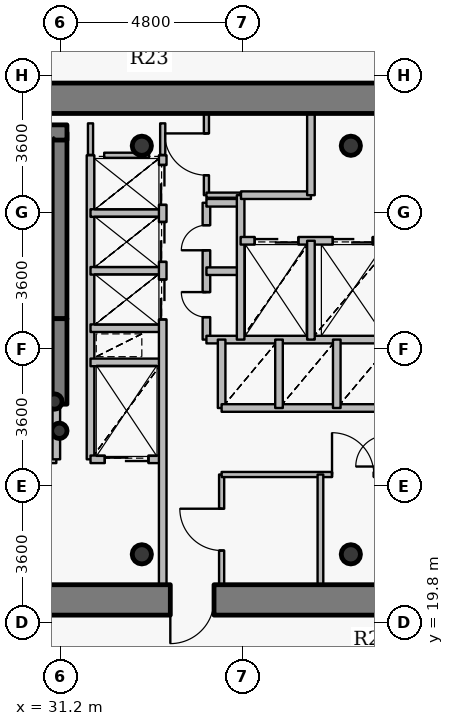
"""IFC4 building model, lengths in metres.
Left out: names, types, materials, properties, quantities, classifications, styles, units other than length and angle.
Written with IfcOpenShell. Run it as: python <this file> out.ifc"""

import sys

from ifc_helpers import new_model, si_unit, direction, frame, frame_2d, origin, origin_2d, place, context, subcontext, project, spatial, rectangle, hollow_circle, extrude, source, transform, mapped, element, fill, save


model = new_model("IFC4")
c1 = context("Model", 3, precision=1e-05, world=origin(), true_north=direction((0.0, 1.0)))
c2 = subcontext(c1, "Body", "Model", "MODEL_VIEW")
j1 = project(units=[si_unit("LENGTHUNIT", "METRE"), si_unit("PLANEANGLEUNIT", "RADIAN")], contexts=[c1])
p1 = place(None, origin())
s1 = spatial("IfcSite", under=j1, at=p1, CompositionType="ELEMENT")
p2 = place(p1, origin())
s2 = spatial("IfcBuilding", under=s1, at=p2, CompositionType="ELEMENT")
p3 = place(p2, frame((0.0, 0.0, 186.15)))
s3 = spatial("IfcBuildingStorey", under=s2, at=p3, CompositionType="ELEMENT", Elevation=186.15)
for number, where, z_axis, x_axis in (
    (1, (33.35, 21.6, 0.0), (0.0, 0.0, 1.0), (1.0, 0.0, 0.0)),
    (2, (38.85, 21.6, 0.0), (0.0, 0.0, 1.0), (1.0, 0.0, 0.0)),
    (3, (38.85, 32.35, 0.0), (0.0, 0.0, 1.0), (1.0, 0.0, 0.0)),
    (4, (33.35, 32.35, 0.0), (0.0, 0.0, 1.0), (1.0, 0.0, 0.0)),
):
    element("IfcColumn", number, at=place(p3, frame(where, z_axis=z_axis, x_axis=x_axis)), inside=s3, PredefinedType="COLUMN", context=c2, shape_type="SweptSolid", body=[
        extrude(hollow_circle(Radius=0.254, WallThickness=0.02, at=origin_2d()), origin(), (0.0, 0.0, 1.0), 3.75),
    ])
p4 = place(p3, frame((31.18, 27.8, 0.0), z_axis=(0.0, 0.0, 1.0), x_axis=(0.0, 1.0, 0.0)))
e5 = element("IfcWall", 5, at=p4, inside=s3, PredefinedType="SHEAR", context=c2, shape_type="SweptSolid", body=[
    extrude(rectangle(XDim=4.9, YDim=0.4, at=frame_2d((2.45, 0.0))), origin(), (0.0, 0.0, 1.0), 3.75),
])
p5 = place(p3, frame((27.28, 32.7, 0.0), z_axis=(0.0, 0.0, 1.0), x_axis=(1.0, 0.0, 0.0)))
e6 = element("IfcWall", 6, at=p5, inside=s3, PredefinedType="SHEAR", context=c2, shape_type="SweptSolid", body=[
    extrude(rectangle(XDim=4.1, YDim=0.4, at=frame_2d((2.05, 0.0))), origin(), (0.0, 0.0, 1.0), 3.75),
])
for number, where, z_axis, x_axis in (
    (7, (31.05, 25.62, 0.0), (0.0, 0.0, 1.0), (1.0, 0.0, 0.0)),
    (8, (31.18, 24.85, 0.0), (0.0, 0.0, 1.0), (1.0, 0.0, 0.0)),
):
    element("IfcColumn", number, at=place(p3, frame(where, z_axis=z_axis, x_axis=x_axis)), inside=s3, PredefinedType="COLUMN", context=c2, shape_type="SweptSolid", body=[
        extrude(hollow_circle(Radius=0.203, WallThickness=0.016, at=origin_2d()), origin(), (0.0, 0.0, 1.0), 3.75),
    ])
p6 = place(p3, frame((27.2, 33.6, 0.0), z_axis=(0.0, 0.0, 1.0), x_axis=(1.0, 0.0, 0.0)))
e9 = element("IfcWall", 9, at=p6, inside=s3, PredefinedType="SHEAR", context=c2, shape_type="SweptSolid", body=[
    extrude(rectangle(XDim=17.6, YDim=0.8, at=frame_2d((8.8, 0.0))), origin(), (0.0, 0.0, 1.0), 2.95),
])
p7 = place(p6, frame((13.45, 0.0, 0.0)))
e10 = element("IfcOpeningElement", 10, at=p7, cuts=e9, PredefinedType="OPENING", context=c2, shape_type="SweptSolid", body=[
    extrude(rectangle(XDim=1.15, YDim=2.15, at=origin_2d()), frame((0.575, 0.41, 1.075), z_axis=(0.0, -1.0, 0.0), x_axis=(1.0, 0.0, 0.0)), (0.0, 0.0, 1.0), 0.82),
])
p8 = place(p3, frame((44.8, 20.4, 0.0), z_axis=(0.0, 0.0, 1.0), x_axis=(-1.0, 0.0, 0.0)))
e11 = element("IfcWall", 11, at=p8, inside=s3, PredefinedType="SHEAR", context=c2, shape_type="SweptSolid", body=[
    extrude(rectangle(XDim=17.6, YDim=0.8, at=frame_2d((8.8, 0.0))), origin(), (0.0, 0.0, 1.0), 2.95),
])
p9 = place(p8, frame((9.55, 0.0, 0.0)))
e12 = element("IfcOpeningElement", 12, at=p9, cuts=e11, PredefinedType="OPENING", context=c2, shape_type="SweptSolid", body=[
    extrude(rectangle(XDim=1.15, YDim=2.15, at=origin_2d()), frame((0.575, 0.41, 1.075), z_axis=(0.0, -1.0, 0.0), x_axis=(1.0, 0.0, 0.0)), (0.0, 0.0, 1.0), 0.82),
])
p10 = place(p3, frame((31.18, 25.55, 0.0), z_axis=(0.0, 0.0, 1.0), x_axis=(0.0, 1.0, 0.0)))
e13 = element("IfcWall", 13, at=p10, inside=s3, PredefinedType="SHEAR", context=c2, shape_type="SweptSolid", body=[
    extrude(rectangle(XDim=2.25, YDim=0.4, at=frame_2d((1.125, 0.0))), origin(), (0.0, 0.0, 1.0), 3.1),
])
p11 = place(p3, frame((27.56, 24.1, 0.0), z_axis=(0.0, 0.0, 1.0), x_axis=(1.0, 0.0, 0.0)))
e14 = element("IfcWall", 14, at=p11, inside=s3, PredefinedType="PARTITIONING", context=c2, shape_type="SweptSolid", body=[
    extrude(rectangle(XDim=3.54, YDim=0.2, at=frame_2d((1.77, 0.0))), origin(), (0.0, 0.0, 1.0), 3.5),
])
p12 = place(p11, frame((1.17, 0.0, 0.0)))
e15 = element("IfcOpeningElement", 15, at=p12, cuts=e14, PredefinedType="OPENING", context=c2, shape_type="SweptSolid", body=[
    extrude(rectangle(XDim=1.2, YDim=2.15, at=origin_2d()), frame((0.6, 0.11, 1.075), z_axis=(0.0, -1.0, 0.0), x_axis=(1.0, 0.0, 0.0)), (0.0, 0.0, 1.0), 0.22),
])
p13 = place(p3, frame((31.1, 24.1, 0.0), z_axis=(0.0, 0.0, 1.0), x_axis=(0.0, 1.0, 0.0)))
e16 = element("IfcWall", 16, at=p13, inside=s3, PredefinedType="PARTITIONING", context=c2, shape_type="SweptSolid", body=[
    extrude(rectangle(XDim=1.44, YDim=0.2, at=frame_2d((0.72, 0.0))), origin(), (0.0, 0.0, 1.0), 3.5),
])
p14 = place(p3, frame((32.0, 24.1, 0.0), z_axis=(0.0, 0.0, 1.0), x_axis=(0.0, 1.0, 0.0)))
e17 = element("IfcWall", 17, at=p14, inside=s3, PredefinedType="PARTITIONING", context=c2, shape_type="SweptSolid", body=[
    extrude(rectangle(XDim=8.0, YDim=0.2, at=frame_2d((4.0, 0.0))), origin(), (0.0, 0.0, 1.0), 3.5),
])
p15 = place(p3, frame((32.0, 24.1, 0.0), z_axis=(0.0, 0.0, 1.0), x_axis=(1.0, 0.0, 0.0)))
e18 = element("IfcWall", 18, at=p15, inside=s3, PredefinedType="PARTITIONING", context=c2, shape_type="SweptSolid", body=[
    extrude(rectangle(XDim=1.9, YDim=0.2, at=frame_2d((0.95, 0.0))), origin(), (0.0, 0.0, 1.0), 3.085),
])
p16 = place(p15, frame((0.375, 0.0, 0.0)))
e19 = element("IfcOpeningElement", 19, at=p16, cuts=e18, PredefinedType="OPENING", context=c2, shape_type="SweptSolid", body=[
    extrude(rectangle(XDim=1.15, YDim=2.15, at=origin_2d()), frame((0.575, 0.11, 1.075), z_axis=(0.0, -1.0, 0.0), x_axis=(1.0, 0.0, 0.0)), (0.0, 0.0, 1.0), 0.22),
])
for number, where, z_axis, x_axis in (
    (20, (32.0, 26.65, 0.0), (0.0, 0.0, 1.0), (1.0, 0.0, 0.0)),
    (21, (32.0, 27.55, 0.0), (0.0, 0.0, 1.0), (1.0, 0.0, 0.0)),
    (22, (32.0, 29.06, 0.0), (0.0, 0.0, 1.0), (1.0, 0.0, 0.0)),
    (23, (32.0, 30.58, 0.0), (0.0, 0.0, 1.0), (1.0, 0.0, 0.0)),
):
    element("IfcWall", number, at=place(p3, frame(where, z_axis=z_axis, x_axis=x_axis)), inside=s3, PredefinedType="PARTITIONING", context=c2, shape_type="SweptSolid", body=[
        extrude(rectangle(XDim=1.9, YDim=0.2, at=frame_2d((0.95, 0.0))), origin(), (0.0, 0.0, 1.0), 3.085),
    ])
p17 = place(p3, frame((33.9, 20.8, 0.0), z_axis=(0.0, 0.0, 1.0), x_axis=(0.0, 1.0, 0.0)))
e24 = element("IfcWall", 24, at=p17, inside=s3, PredefinedType="PARTITIONING", context=c2, shape_type="SweptSolid", body=[
    extrude(rectangle(XDim=11.3, YDim=0.2, at=frame_2d((5.65, 0.0))), origin(), (0.0, 0.0, 1.0), 3.085),
])
p18 = place(p17, frame((6.98, 0.0, 0.0)))
e25 = element("IfcOpeningElement", 25, at=p18, cuts=e24, PredefinedType="OPENING", context=c2, shape_type="SweptSolid", body=[
    extrude(rectangle(XDim=1.05, YDim=2.15, at=origin_2d()), frame((0.525, 0.11, 1.075), z_axis=(0.0, -1.0, 0.0), x_axis=(1.0, 0.0, 0.0)), (0.0, 0.0, 1.0), 0.22),
])
p19 = place(p17, frame((8.495, 0.0, 0.0)))
e26 = element("IfcOpeningElement", 26, at=p19, cuts=e24, PredefinedType="OPENING", context=c2, shape_type="SweptSolid", body=[
    extrude(rectangle(XDim=1.05, YDim=2.15, at=origin_2d()), frame((0.525, 0.11, 1.075), z_axis=(0.0, -1.0, 0.0), x_axis=(1.0, 0.0, 0.0)), (0.0, 0.0, 1.0), 0.22),
])
p20 = place(p17, frame((9.995, 0.0, 0.0)))
e27 = element("IfcOpeningElement", 27, at=p20, cuts=e24, PredefinedType="OPENING", context=c2, shape_type="SweptSolid", body=[
    extrude(rectangle(XDim=1.05, YDim=2.15, at=origin_2d()), frame((0.525, 0.11, 1.075), z_axis=(0.0, -1.0, 0.0), x_axis=(1.0, 0.0, 0.0)), (0.0, 0.0, 1.0), 0.22),
])
p21 = place(p3, frame((35.05, 27.25, 0.0), z_axis=(0.0, 0.0, 1.0), x_axis=(0.0, 1.0, 0.0)))
e28 = element("IfcWall", 28, at=p21, inside=s3, PredefinedType="PARTITIONING", context=c2, shape_type="SweptSolid", body=[
    extrude(rectangle(XDim=3.6, YDim=0.2, at=frame_2d((1.8, 0.0))), origin(), (0.0, 0.0, 1.0), 3.5),
])
p22 = place(p21, frame((0.59, 0.0, 0.0)))
e29 = element("IfcOpeningElement", 29, at=p22, cuts=e28, PredefinedType="OPENING", context=c2, shape_type="SweptSolid", body=[
    extrude(rectangle(XDim=0.66, YDim=2.05, at=origin_2d()), frame((0.33, 0.11, 1.025), z_axis=(0.0, -1.0, 0.0), x_axis=(1.0, 0.0, 0.0)), (0.0, 0.0, 1.0), 0.22),
])
p23 = place(p21, frame((2.35, 0.0, 0.0)))
e30 = element("IfcOpeningElement", 30, at=p23, cuts=e28, PredefinedType="OPENING", context=c2, shape_type="SweptSolid", body=[
    extrude(rectangle(XDim=0.66, YDim=2.05, at=origin_2d()), frame((0.33, 0.11, 1.025), z_axis=(0.0, -1.0, 0.0), x_axis=(1.0, 0.0, 0.0)), (0.0, 0.0, 1.0), 0.22),
])
p24 = place(p3, frame((35.05, 27.25, 0.0), z_axis=(0.0, 0.0, 1.0), x_axis=(1.0, 0.0, 0.0)))
e31 = element("IfcWall", 31, at=p24, inside=s3, PredefinedType="PARTITIONING", context=c2, shape_type="SweptSolid", body=[
    extrude(rectangle(XDim=4.95, YDim=0.2, at=frame_2d((2.475, 0.0))), origin(), (0.0, 0.0, 1.0), 3.085),
])
for number, where, z_axis, x_axis in (
    (32, (35.05, 29.05, 0.0), (0.0, 0.0, 1.0), (1.0, 0.0, 0.0)),
    (33, (35.05, 30.85, 0.0), (0.0, 0.0, 1.0), (1.0, 0.0, 0.0)),
):
    element("IfcWall", number, at=place(p3, frame(where, z_axis=z_axis, x_axis=x_axis)), inside=s3, PredefinedType="PARTITIONING", context=c2, shape_type="SweptSolid", body=[
        extrude(rectangle(XDim=0.9, YDim=0.2, at=frame_2d((0.45, 0.0))), origin(), (0.0, 0.0, 1.0), 3.5),
    ])
p25 = place(p3, frame((35.05, 31.05, 0.0), z_axis=(0.0, 0.0, 1.0), x_axis=(0.0, 1.0, 0.0)))
e34 = element("IfcWall", 34, at=p25, inside=s3, PredefinedType="PARTITIONING", context=c2, shape_type="SweptSolid", body=[
    extrude(rectangle(XDim=2.15, YDim=0.135, at=frame_2d((1.075, 0.0))), origin(), (0.0, 0.0, 1.0), 3.085),
])
p26 = place(p25, frame((0.525, 0.0, 0.0)))
e35 = element("IfcOpeningElement", 35, at=p26, cuts=e34, PredefinedType="OPENING", context=c2, shape_type="SweptSolid", body=[
    extrude(rectangle(XDim=1.1, YDim=2.15, at=origin_2d()), frame((0.55, 0.078, 1.075), z_axis=(0.0, -1.0, 0.0), x_axis=(1.0, 0.0, 0.0)), (0.0, 0.0, 1.0), 0.155),
])
p27 = place(p3, frame((35.05, 31.05, 0.0), z_axis=(0.0, 0.0, 1.0), x_axis=(1.0, 0.0, 0.0)))
e36 = element("IfcWall", 36, at=p27, inside=s3, PredefinedType="PARTITIONING", context=c2, shape_type="SweptSolid", body=[
    extrude(rectangle(XDim=0.9, YDim=0.135, at=frame_2d((0.45, 0.0))), origin(), (0.0, 0.0, 1.0), 3.5),
])
p28 = place(p3, frame((35.45, 20.8, 0.0), z_axis=(0.0, 0.0, 1.0), x_axis=(0.0, 1.0, 0.0)))
e37 = element("IfcWall", 37, at=p28, inside=s3, PredefinedType="PARTITIONING", context=c2, shape_type="SweptSolid", body=[
    extrude(rectangle(XDim=2.9, YDim=0.135, at=frame_2d((1.45, 0.0))), origin(), (0.0, 0.0, 1.0), 3.085),
])
p29 = place(p28, frame((0.9, 0.0, 0.0)))
e38 = element("IfcOpeningElement", 38, at=p29, cuts=e37, PredefinedType="OPENING", context=c2, shape_type="SweptSolid", body=[
    extrude(rectangle(XDim=1.1, YDim=2.15, at=origin_2d()), frame((0.55, 0.078, 1.075), z_axis=(0.0, -1.0, 0.0), x_axis=(1.0, 0.0, 0.0)), (0.0, 0.0, 1.0), 0.155),
])
p30 = place(p3, frame((35.45, 23.7, 0.0), z_axis=(0.0, 0.0, 1.0), x_axis=(1.0, 0.0, 0.0)))
e39 = element("IfcWall", 39, at=p30, inside=s3, PredefinedType="PARTITIONING", context=c2, shape_type="SweptSolid", body=[
    extrude(rectangle(XDim=4.35, YDim=0.135, at=frame_2d((2.175, 0.0))), origin(), (0.0, 0.0, 1.0), 3.085),
])
p31 = place(p30, frame((2.905, 0.0, 0.0)))
e40 = element("IfcOpeningElement", 40, at=p31, cuts=e39, PredefinedType="OPENING", context=c2, shape_type="SweptSolid", body=[
    extrude(rectangle(XDim=1.1, YDim=2.15, at=origin_2d()), frame((0.55, 0.078, 1.075), z_axis=(0.0, -1.0, 0.0), x_axis=(1.0, 0.0, 0.0)), (0.0, 0.0, 1.0), 0.155),
])
p32 = place(p3, frame((35.45, 25.45, 0.0), z_axis=(0.0, 0.0, 1.0), x_axis=(0.0, 1.0, 0.0)))
e41 = element("IfcWall", 41, at=p32, inside=s3, PredefinedType="PARTITIONING", context=c2, shape_type="SweptSolid", body=[
    extrude(rectangle(XDim=1.8, YDim=0.2, at=frame_2d((0.9, 0.0))), origin(), (0.0, 0.0, 1.0), 3.5),
])
p33 = place(p3, frame((35.45, 25.45, 0.0), z_axis=(0.0, 0.0, 1.0), x_axis=(1.0, 0.0, 0.0)))
e42 = element("IfcWall", 42, at=p33, inside=s3, PredefinedType="PARTITIONING", context=c2, shape_type="SweptSolid", body=[
    extrude(rectangle(XDim=4.55, YDim=0.2, at=frame_2d((2.275, 0.0))), origin(), (0.0, 0.0, 1.0), 3.085),
])
p34 = place(p3, frame((35.95, 27.25, 0.0), z_axis=(0.0, 0.0, 1.0), x_axis=(0.0, 1.0, 0.0)))
e43 = element("IfcWall", 43, at=p34, inside=s3, PredefinedType="PARTITIONING", context=c2, shape_type="SweptSolid", body=[
    extrude(rectangle(XDim=3.8, YDim=0.2, at=frame_2d((1.9, 0.0))), origin(), (0.0, 0.0, 1.0), 3.5),
])
p35 = place(p3, frame((35.95, 29.85, 0.0), z_axis=(0.0, 0.0, 1.0), x_axis=(1.0, 0.0, 0.0)))
e44 = element("IfcWall", 44, at=p35, inside=s3, PredefinedType="PARTITIONING", context=c2, shape_type="SweptSolid", body=[
    extrude(rectangle(XDim=8.49, YDim=0.2, at=frame_2d((4.245, 0.0))), origin(), (0.0, 0.0, 1.0), 3.085),
])
p36 = place(p35, frame((6.1, 0.0, 0.0)))
e45 = element("IfcOpeningElement", 45, at=p36, cuts=e44, PredefinedType="OPENING", context=c2, shape_type="SweptSolid", body=[
    extrude(rectangle(XDim=1.2, YDim=2.15, at=origin_2d()), frame((0.6, 0.11, 1.075), z_axis=(0.0, -1.0, 0.0), x_axis=(1.0, 0.0, 0.0)), (0.0, 0.0, 1.0), 0.22),
])
p37 = place(p35, frame((0.37, 0.0, 0.0)))
e46 = element("IfcOpeningElement", 46, at=p37, cuts=e44, PredefinedType="OPENING", context=c2, shape_type="SweptSolid", body=[
    extrude(rectangle(XDim=1.15, YDim=2.15, at=origin_2d()), frame((0.575, 0.11, 1.075), z_axis=(0.0, -1.0, 0.0), x_axis=(1.0, 0.0, 0.0)), (0.0, 0.0, 1.0), 0.22),
])
p38 = place(p35, frame((2.425, 0.0, 0.0)))
e47 = element("IfcOpeningElement", 47, at=p38, cuts=e44, PredefinedType="OPENING", context=c2, shape_type="SweptSolid", body=[
    extrude(rectangle(XDim=1.05, YDim=2.15, at=origin_2d()), frame((0.525, 0.11, 1.075), z_axis=(0.0, -1.0, 0.0), x_axis=(1.0, 0.0, 0.0)), (0.0, 0.0, 1.0), 0.22),
])
p39 = place(p3, frame((35.96, 31.05, 0.0), z_axis=(0.0, 0.0, 1.0), x_axis=(1.0, 0.0, 0.0)))
e48 = element("IfcWall", 48, at=p39, inside=s3, PredefinedType="PARTITIONING", context=c2, shape_type="SweptSolid", body=[
    extrude(rectangle(XDim=1.84, YDim=0.2, at=frame_2d((0.92, 0.0))), origin(), (0.0, 0.0, 1.0), 3.5),
])
p40 = place(p3, frame((36.96, 25.45, 0.0), z_axis=(0.0, 0.0, 1.0), x_axis=(0.0, 1.0, 0.0)))
e49 = element("IfcWall", 49, at=p40, inside=s3, PredefinedType="PARTITIONING", context=c2, shape_type="SweptSolid", body=[
    extrude(rectangle(XDim=1.8, YDim=0.2, at=frame_2d((0.9, 0.0))), origin(), (0.0, 0.0, 1.0), 3.5),
])
p41 = place(p3, frame((37.8, 27.25, 0.0), z_axis=(0.0, 0.0, 1.0), x_axis=(0.0, 1.0, 0.0)))
e50 = element("IfcWall", 50, at=p41, inside=s3, PredefinedType="PARTITIONING", context=c2, shape_type="SweptSolid", body=[
    extrude(rectangle(XDim=2.6, YDim=0.2, at=frame_2d((1.3, 0.0))), origin(), (0.0, 0.0, 1.0), 3.5),
])
p42 = place(p3, frame((37.8, 31.05, 0.0), z_axis=(0.0, 0.0, 1.0), x_axis=(0.0, 1.0, 0.0)))
e51 = element("IfcWall", 51, at=p42, inside=s3, PredefinedType="PARTITIONING", context=c2, shape_type="SweptSolid", body=[
    extrude(rectangle(XDim=2.15, YDim=0.2, at=frame_2d((1.075, 0.0))), origin(), (0.0, 0.0, 1.0), 3.085),
])
p43 = place(p3, frame((38.05, 20.18, 0.0), z_axis=(0.0, 0.0, 1.0), x_axis=(0.0, 1.0, 0.0)))
e52 = element("IfcWall", 52, at=p43, inside=s3, PredefinedType="PARTITIONING", context=c2, shape_type="SweptSolid", body=[
    extrude(rectangle(XDim=3.52, YDim=0.15, at=frame_2d((1.76, 0.0))), origin(), (0.0, 0.0, 1.0), 2.935),
])
p44 = place(p3, frame((38.48, 25.45, 0.0), z_axis=(0.0, 0.0, 1.0), x_axis=(0.0, 1.0, 0.0)))
e53 = element("IfcWall", 53, at=p44, inside=s3, PredefinedType="PARTITIONING", context=c2, shape_type="SweptSolid", body=[
    extrude(rectangle(XDim=1.8, YDim=0.2, at=frame_2d((0.9, 0.0))), origin(), (0.0, 0.0, 1.0), 3.5),
])
p45 = place(p3, frame((32.36, 32.1, 0.0), z_axis=(0.0, 0.0, 1.0), x_axis=(1.0, 0.0, 0.0)))
e54 = element("IfcWall", 54, at=p45, inside=s3, PredefinedType="PARTITIONING", context=c2, shape_type="SweptSolid", body=[
    extrude(rectangle(XDim=1.18, YDim=0.135, at=frame_2d((0.59, 0.0))), origin(), (0.0, 0.0, 1.0), 3.085),
])
p46 = place(p3, frame((32.0, 32.94, 0.0), z_axis=(0.0, 0.0, 1.0), x_axis=(0.0, -1.0, 0.0)))
e55 = element("IfcWall", 55, at=p46, inside=s3, PredefinedType="PARTITIONING", context=c2, shape_type="SweptSolid", body=[
    extrude(rectangle(XDim=0.83, YDim=0.135, at=frame_2d((0.415, 0.0))), origin(), (0.0, 0.0, 1.0), 3.035),
])
p47 = place(p3, frame((33.9, 32.11, 0.0), z_axis=(0.0, 0.0, 1.0), x_axis=(0.0, 1.0, 0.0)))
e56 = element("IfcWall", 56, at=p47, inside=s3, PredefinedType="PARTITIONING", context=c2, shape_type="SweptSolid", body=[
    extrude(rectangle(XDim=0.83, YDim=0.135, at=frame_2d((0.415, 0.0))), origin(), (0.0, 0.0, 1.0), 3.085),
])
m1 = source(origin(), c2, "Body", "SweptSolid", [
    extrude(rectangle(XDim=1.15, YDim=2.15, at=origin_2d()), frame((0.575, 0.025, 1.075), z_axis=(0.0, -1.0, 0.0), x_axis=(1.0, 0.0, 0.0)), (0.0, 0.0, 1.0), 0.05),
])
p48 = place(p9, origin())
e57 = element("IfcDoor", 57, at=p48, inside=s3, OperationType="SINGLE_SWING_RIGHT", PredefinedType="DOOR", context=c2, shape_type="MappedRepresentation", body=[
    mapped(m1, transform((0.0, 0.0, 0.0), x_axis=(1.0, 0.0, 0.0), y_axis=(0.0, 1.0, 0.0), z_axis=(0.0, 0.0, 1.0), scale=1.0)),
])
fill(e12, e57)
m2 = source(origin(), c2, "Body", "SweptSolid", [
    extrude(rectangle(XDim=1.15, YDim=2.15, at=origin_2d()), frame((0.575, 0.025, 1.075), z_axis=(0.0, -1.0, 0.0), x_axis=(1.0, 0.0, 0.0)), (0.0, 0.0, 1.0), 0.05),
])
p49 = place(p37, origin())
e58 = element("IfcDoor", 58, at=p49, inside=s3, OperationType="DOUBLE_DOOR_SLIDING", PredefinedType="USERDEFINED", context=c2, shape_type="MappedRepresentation", body=[
    mapped(m2, transform((0.0, 0.0, 0.0), x_axis=(1.0, 0.0, 0.0), y_axis=(0.0, 1.0, 0.0), z_axis=(0.0, 0.0, 1.0), scale=1.0)),
])
fill(e46, e58)
p50 = place(p16, origin())
e59 = element("IfcDoor", 59, at=p50, inside=s3, OperationType="DOUBLE_DOOR_SLIDING", PredefinedType="USERDEFINED", context=c2, shape_type="MappedRepresentation", body=[
    mapped(m2, transform((0.0, 0.0, 0.0), x_axis=(1.0, 0.0, 0.0), y_axis=(0.0, 1.0, 0.0), z_axis=(0.0, 0.0, 1.0), scale=1.0)),
])
fill(e19, e59)
m3 = source(origin(), c2, "Body", "SweptSolid", [
    extrude(rectangle(XDim=1.05, YDim=2.15, at=origin_2d()), frame((0.525, 0.025, 1.075), z_axis=(0.0, -1.0, 0.0), x_axis=(1.0, 0.0, 0.0)), (0.0, 0.0, 1.0), 0.05),
])
p51 = place(p38, origin())
e60 = element("IfcDoor", 60, at=p51, inside=s3, OperationType="DOUBLE_DOOR_SLIDING", PredefinedType="USERDEFINED", context=c2, shape_type="MappedRepresentation", body=[
    mapped(m3, transform((0.0, 0.0, 0.0), x_axis=(1.0, 0.0, 0.0), y_axis=(0.0, 1.0, 0.0), z_axis=(0.0, 0.0, 1.0), scale=1.0)),
])
fill(e47, e60)
p52 = place(p18, origin())
e61 = element("IfcDoor", 61, at=p52, inside=s3, OperationType="DOUBLE_DOOR_SLIDING", PredefinedType="USERDEFINED", context=c2, shape_type="MappedRepresentation", body=[
    mapped(m3, transform((0.0, 0.0, 0.0), x_axis=(1.0, 0.0, 0.0), y_axis=(0.0, 1.0, 0.0), z_axis=(0.0, 0.0, 1.0), scale=1.0)),
])
fill(e25, e61)
p53 = place(p19, origin())
e62 = element("IfcDoor", 62, at=p53, inside=s3, OperationType="DOUBLE_DOOR_SLIDING", PredefinedType="USERDEFINED", context=c2, shape_type="MappedRepresentation", body=[
    mapped(m3, transform((0.0, 0.0, 0.0), x_axis=(1.0, 0.0, 0.0), y_axis=(0.0, 1.0, 0.0), z_axis=(0.0, 0.0, 1.0), scale=1.0)),
])
fill(e26, e62)
p54 = place(p20, origin())
e63 = element("IfcDoor", 63, at=p54, inside=s3, OperationType="DOUBLE_DOOR_SLIDING", PredefinedType="USERDEFINED", context=c2, shape_type="MappedRepresentation", body=[
    mapped(m3, transform((0.0, 0.0, 0.0), x_axis=(1.0, 0.0, 0.0), y_axis=(0.0, 1.0, 0.0), z_axis=(0.0, 0.0, 1.0), scale=1.0)),
])
fill(e27, e63)
m4 = source(origin(), c2, "Body", "SweptSolid", [
    extrude(rectangle(XDim=0.66, YDim=2.05, at=origin_2d()), frame((0.33, 0.025, 1.025), z_axis=(0.0, -1.0, 0.0), x_axis=(1.0, 0.0, 0.0)), (0.0, 0.0, 1.0), 0.05),
])
p55 = place(p22, origin())
e64 = element("IfcDoor", 64, at=p55, inside=s3, OperationType="SINGLE_SWING_RIGHT", PredefinedType="USERDEFINED", context=c2, shape_type="MappedRepresentation", body=[
    mapped(m4, transform((0.0, 0.0, 0.0), x_axis=(1.0, 0.0, 0.0), y_axis=(0.0, 1.0, 0.0), z_axis=(0.0, 0.0, 1.0), scale=1.0)),
])
fill(e29, e64)
p56 = place(p23, origin())
e65 = element("IfcDoor", 65, at=p56, inside=s3, OperationType="SINGLE_SWING_LEFT", PredefinedType="USERDEFINED", context=c2, shape_type="MappedRepresentation", body=[
    mapped(m4, transform((0.0, 0.0, 0.0), x_axis=(1.0, 0.0, 0.0), y_axis=(0.0, 1.0, 0.0), z_axis=(0.0, 0.0, 1.0), scale=1.0)),
])
fill(e30, e65)
m5 = source(origin(), c2, "Body", "SweptSolid", [
    extrude(rectangle(XDim=1.1, YDim=2.15, at=origin_2d()), frame((0.55, 0.025, 1.075), z_axis=(0.0, -1.0, 0.0), x_axis=(1.0, 0.0, 0.0)), (0.0, 0.0, 1.0), 0.05),
])
p57 = place(p29, origin())
e66 = element("IfcDoor", 66, at=p57, inside=s3, OperationType="SINGLE_SWING_RIGHT", PredefinedType="DOOR", context=c2, shape_type="MappedRepresentation", body=[
    mapped(m5, transform((0.0, 0.0, 0.0), x_axis=(1.0, 0.0, 0.0), y_axis=(0.0, 1.0, 0.0), z_axis=(0.0, 0.0, 1.0), scale=1.0)),
])
fill(e38, e66)
p58 = place(p31, origin())
e67 = element("IfcDoor", 67, at=p58, inside=s3, OperationType="SINGLE_SWING_LEFT", PredefinedType="DOOR", context=c2, shape_type="MappedRepresentation", body=[
    mapped(m5, transform((0.0, 0.0, 0.0), x_axis=(1.0, 0.0, 0.0), y_axis=(0.0, 1.0, 0.0), z_axis=(0.0, 0.0, 1.0), scale=1.0)),
])
fill(e40, e67)
p59 = place(p26, origin())
e68 = element("IfcDoor", 68, at=p59, inside=s3, OperationType="SINGLE_SWING_RIGHT", PredefinedType="DOOR", context=c2, shape_type="MappedRepresentation", body=[
    mapped(m5, transform((0.0, 0.0, 0.0), x_axis=(1.0, 0.0, 0.0), y_axis=(0.0, 1.0, 0.0), z_axis=(0.0, 0.0, 1.0), scale=1.0)),
])
fill(e35, e68)
save(model, sys.argv[1])
